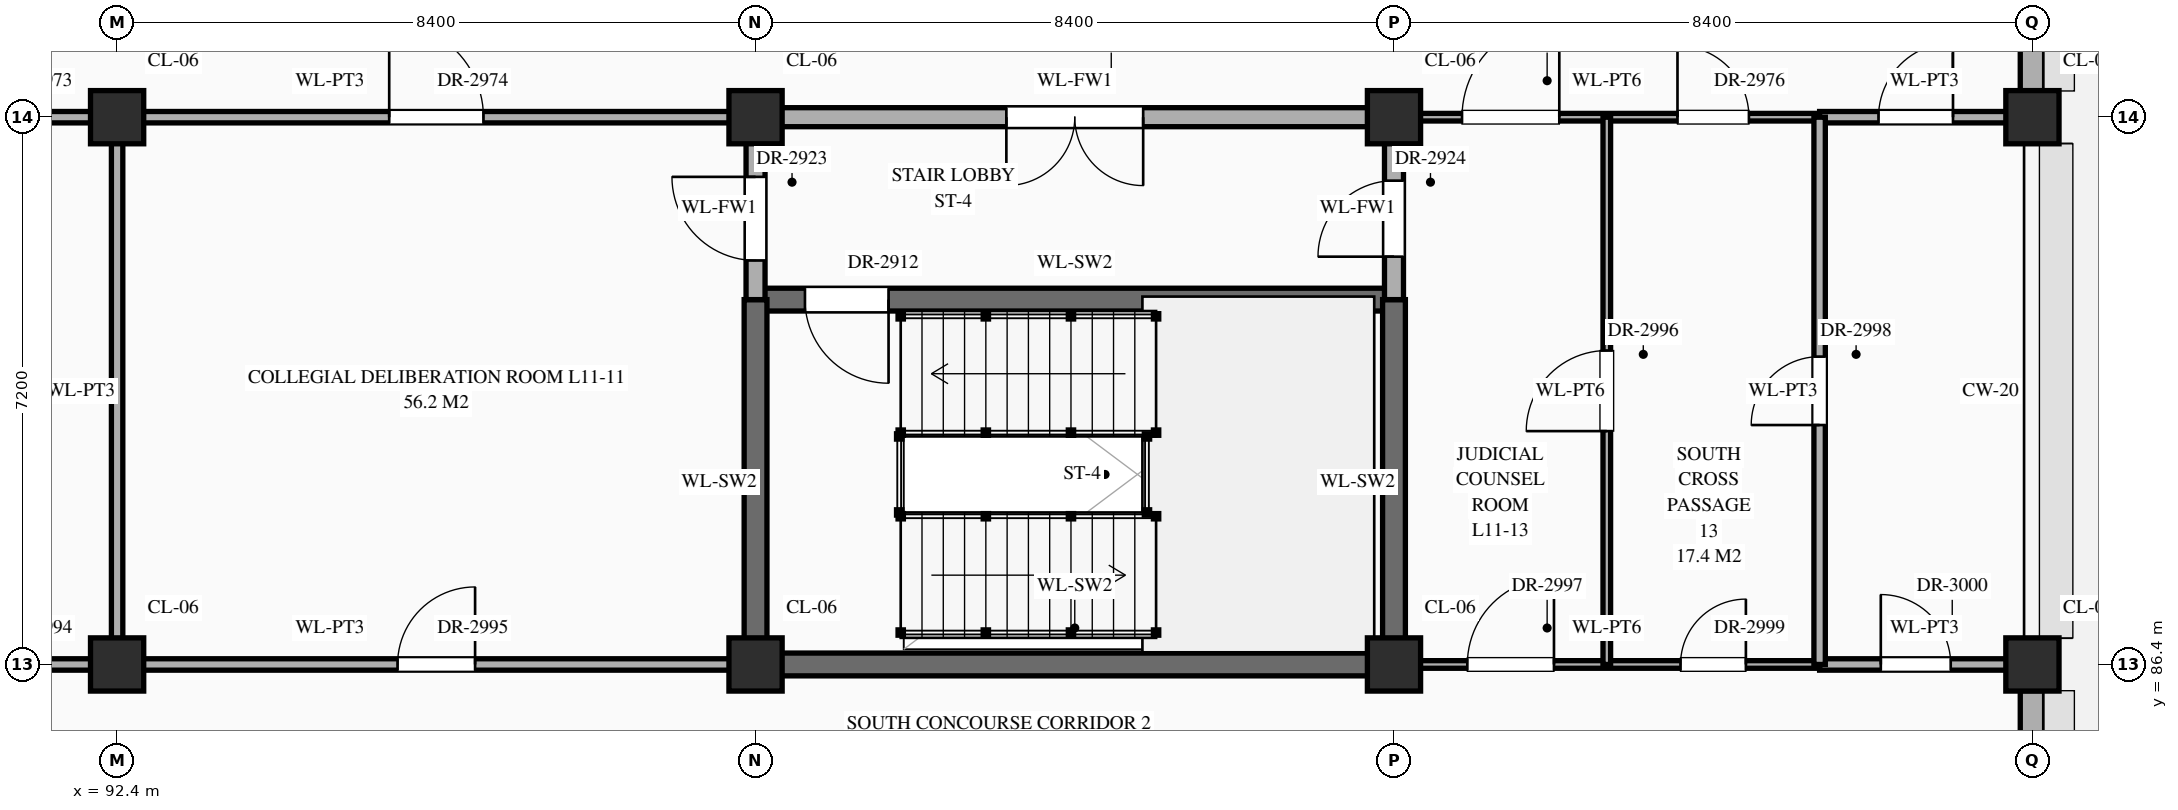
"""IFC4 building model, lengths in metres.
Left out: names, types, materials, properties, quantities, classifications, styles, units other than length and angle.
Written with IfcOpenShell. Run it as: python <this file> out.ifc"""

import sys

from ifc_helpers import new_model, si_unit, direction, frame, frame_2d, origin, origin_2d, place, context, subcontext, project, spatial, rectangle, extrude, element, fill, save


model = new_model("IFC4")
c1 = context("Model", 3, precision=1e-05, world=origin(), true_north=direction((0.0, 1.0)))
c2 = subcontext(c1, "Body", "Model", "MODEL_VIEW")
j1 = project(units=[si_unit("LENGTHUNIT", "METRE"), si_unit("PLANEANGLEUNIT", "RADIAN")], contexts=[c1])
p1 = place(None, origin())
s1 = spatial("IfcSite", under=j1, at=p1, CompositionType="ELEMENT")
p2 = place(p1, origin())
s2 = spatial("IfcBuilding", under=s1, at=p2, CompositionType="ELEMENT")
p3 = place(p2, frame((0.0, 0.0, 47.7)))
s3 = spatial("IfcBuildingStorey", under=s2, at=p3, CompositionType="ELEMENT", Elevation=47.7)
for number, where, z_axis, x_axis in (
    (1, (92.4, 86.4, 0.0), (0.0, 0.0, 1.0), (1.0, 0.0, 0.0)),
    (2, (92.4, 93.6, 0.0), (0.0, 0.0, 1.0), (1.0, 0.0, 0.0)),
    (3, (100.8, 86.4, 0.0), (0.0, 0.0, 1.0), (1.0, 0.0, 0.0)),
    (4, (100.8, 93.6, 0.0), (0.0, 0.0, 1.0), (1.0, 0.0, 0.0)),
    (5, (109.2, 86.4, 0.0), (0.0, 0.0, 1.0), (1.0, 0.0, 0.0)),
    (6, (109.2, 93.6, 0.0), (0.0, 0.0, 1.0), (1.0, 0.0, 0.0)),
    (7, (117.6, 86.4, 0.0), (0.0, 0.0, 1.0), (1.0, 0.0, 0.0)),
    (8, (117.6, 93.6, 0.0), (0.0, 0.0, 1.0), (1.0, 0.0, 0.0)),
):
    element("IfcColumn", number, at=place(p3, frame(where, z_axis=z_axis, x_axis=x_axis)), inside=s3, PredefinedType="COLUMN", context=c2, shape_type="SweptSolid", body=[
        extrude(rectangle(XDim=0.7, YDim=0.7, at=origin_2d()), origin(), (0.0, 0.0, 1.0), 4.2),
    ])
p4 = place(p3, frame((117.6, 79.545, 0.0), z_axis=(0.0, 0.0, 1.0), x_axis=(0.0, 1.0, 0.0)))
e9 = element("IfcWall", 9, at=p4, inside=s3, PredefinedType="STANDARD", context=c2, shape_type="SweptSolid", body=[
    extrude(rectangle(XDim=6.51, YDim=0.32, at=frame_2d((3.255, 0.0))), origin(), (0.0, 0.0, 1.0), 3.31),
])
p5 = place(p4, frame((1.53, 0.0, 0.55)))
e10 = element("IfcOpeningElement", 10, at=p5, cuts=e9, PredefinedType="OPENING", context=c2, shape_type="SweptSolid", body=[
    extrude(rectangle(XDim=1.05, YDim=1.56, at=frame_2d((0.525, 0.78))), frame((0.0, 0.172, 0.0), z_axis=(0.0, -1.0, 0.0), x_axis=(1.0, 0.0, 0.0)), (0.0, 0.0, 1.0), 0.344),
])
p6 = place(p3, frame((117.6, 93.945, 0.0), z_axis=(0.0, 0.0, 1.0), x_axis=(0.0, 1.0, 0.0)))
e11 = element("IfcWall", 11, at=p6, inside=s3, PredefinedType="STANDARD", context=c2, shape_type="SweptSolid", body=[
    extrude(rectangle(XDim=6.51, YDim=0.32, at=frame_2d((3.255, 0.0))), origin(), (0.0, 0.0, 1.0), 3.31),
])
p7 = place(p6, frame((3.88, 0.0, 0.55)))
e12 = element("IfcOpeningElement", 12, at=p7, cuts=e11, PredefinedType="OPENING", context=c2, shape_type="SweptSolid", body=[
    extrude(rectangle(XDim=1.35, YDim=1.92, at=frame_2d((0.675, 0.96))), frame((0.0, 0.172, 0.0), z_axis=(0.0, -1.0, 0.0), x_axis=(1.0, 0.0, 0.0)), (0.0, 0.0, 1.0), 0.344),
])
p8 = place(p3, frame((89.6, 86.4, 0.0), z_axis=(0.0, 0.0, 1.0), x_axis=(1.0, 0.0, 0.0)))
e13 = element("IfcWall", 13, at=p8, inside=s3, PredefinedType="STANDARD", context=c2, shape_type="SweptSolid", body=[
    extrude(rectangle(XDim=11.2, YDim=0.15, at=frame_2d((5.6, 0.0))), origin(), (0.0, 0.0, 1.0), 3.11),
])
p9 = place(p8, frame((0.775, 0.0, 0.0)))
e14 = element("IfcOpeningElement", 14, at=p9, cuts=e13, PredefinedType="OPENING", context=c2, shape_type="SweptSolid", body=[
    extrude(rectangle(XDim=0.98, YDim=2.35, at=frame_2d((0.49, 1.175))), frame((0.0, 0.087, 0.0), z_axis=(0.0, -1.0, 0.0), x_axis=(1.0, 0.0, 0.0)), (0.0, 0.0, 1.0), 0.174),
])
p10 = place(p8, frame((6.49, 0.0, 0.0)))
e15 = element("IfcOpeningElement", 15, at=p10, cuts=e13, PredefinedType="OPENING", context=c2, shape_type="SweptSolid", body=[
    extrude(rectangle(XDim=1.02, YDim=2.4, at=frame_2d((0.51, 1.2))), frame((0.0, 0.087, 0.0), z_axis=(0.0, -1.0, 0.0), x_axis=(1.0, 0.0, 0.0)), (0.0, 0.0, 1.0), 0.174),
])
p11 = place(p3, frame((100.8, 86.4, 0.0), z_axis=(0.0, 0.0, 1.0), x_axis=(1.0, 0.0, 0.0)))
e16 = element("IfcWall", 16, at=p11, inside=s3, PredefinedType="SHEAR", context=c2, shape_type="SweptSolid", body=[
    extrude(rectangle(XDim=8.4, YDim=0.3, at=frame_2d((4.2, 0.0))), origin(), (0.0, 0.0, 1.0), 3.96),
])
p12 = place(p3, frame((109.2, 86.4, 0.0), z_axis=(0.0, 0.0, 1.0), x_axis=(1.0, 0.0, 0.0)))
e17 = element("IfcWall", 17, at=p12, inside=s3, PredefinedType="STANDARD", context=c2, shape_type="SweptSolid", body=[
    extrude(rectangle(XDim=5.6, YDim=0.1, at=frame_2d((2.8, 0.0))), origin(), (0.0, 0.0, 1.0), 3.11),
])
p13 = place(p12, frame((0.965, 0.0, 0.0)))
e18 = element("IfcOpeningElement", 18, at=p13, cuts=e17, PredefinedType="OPENING", context=c2, shape_type="SweptSolid", body=[
    extrude(rectangle(XDim=1.14, YDim=2.4, at=frame_2d((0.57, 1.2))), frame((0.0, 0.062, 0.0), z_axis=(0.0, -1.0, 0.0), x_axis=(1.0, 0.0, 0.0)), (0.0, 0.0, 1.0), 0.124),
])
p14 = place(p12, frame((3.77, 0.0, 0.0)))
e19 = element("IfcOpeningElement", 19, at=p14, cuts=e17, PredefinedType="OPENING", context=c2, shape_type="SweptSolid", body=[
    extrude(rectangle(XDim=0.86, YDim=2.1, at=frame_2d((0.43, 1.05))), frame((0.0, 0.062, 0.0), z_axis=(0.0, -1.0, 0.0), x_axis=(1.0, 0.0, 0.0)), (0.0, 0.0, 1.0), 0.124),
])
p15 = place(p3, frame((114.8, 86.4, 0.0), z_axis=(0.0, 0.0, 1.0), x_axis=(1.0, 0.0, 0.0)))
e20 = element("IfcWall", 20, at=p15, inside=s3, PredefinedType="STANDARD", context=c2, shape_type="SweptSolid", body=[
    extrude(rectangle(XDim=2.76, YDim=0.15, at=frame_2d((1.38, 0.0))), origin(), (0.0, 0.0, 1.0), 3.11),
])
p16 = place(p15, frame((0.805, 0.0, 0.0)))
e21 = element("IfcOpeningElement", 21, at=p16, cuts=e20, PredefinedType="OPENING", context=c2, shape_type="SweptSolid", body=[
    extrude(rectangle(XDim=0.92, YDim=2.15, at=frame_2d((0.46, 1.075))), frame((0.0, 0.087, 0.0), z_axis=(0.0, -1.0, 0.0), x_axis=(1.0, 0.0, 0.0)), (0.0, 0.0, 1.0), 0.174),
])
p17 = place(p3, frame((100.8, 91.2, 0.0), z_axis=(0.0, 0.0, 1.0), x_axis=(1.0, 0.0, 0.0)))
e22 = element("IfcWall", 22, at=p17, inside=s3, PredefinedType="SHEAR", context=c2, shape_type="SweptSolid", body=[
    extrude(rectangle(XDim=8.4, YDim=0.3, at=frame_2d((4.2, 0.0))), origin(), (0.0, 0.0, 1.0), 3.96),
])
p18 = place(p17, frame((0.65, 0.0, 0.0)))
e23 = element("IfcOpeningElement", 23, at=p18, cuts=e22, PredefinedType="OPENING", context=c2, shape_type="SweptSolid", body=[
    extrude(rectangle(XDim=1.1, YDim=2.2, at=frame_2d((0.55, 1.1))), frame((0.0, 0.162, 0.0), z_axis=(0.0, -1.0, 0.0), x_axis=(1.0, 0.0, 0.0)), (0.0, 0.0, 1.0), 0.324),
])
p19 = place(p3, frame((89.6, 93.6, 0.0), z_axis=(0.0, 0.0, 1.0), x_axis=(1.0, 0.0, 0.0)))
e24 = element("IfcWall", 24, at=p19, inside=s3, PredefinedType="STANDARD", context=c2, shape_type="SweptSolid", body=[
    extrude(rectangle(XDim=11.2, YDim=0.15, at=frame_2d((5.6, 0.0))), origin(), (0.0, 0.0, 1.0), 3.11),
])
p20 = place(p19, frame((0.665, 0.0, 0.0)))
e25 = element("IfcOpeningElement", 25, at=p20, cuts=e24, PredefinedType="OPENING", context=c2, shape_type="SweptSolid", body=[
    extrude(rectangle(XDim=1.2, YDim=2.35, at=frame_2d((0.6, 1.175))), frame((0.0, 0.087, 0.0), z_axis=(0.0, -1.0, 0.0), x_axis=(1.0, 0.0, 0.0)), (0.0, 0.0, 1.0), 0.174),
])
p21 = place(p19, frame((6.38, 0.0, 0.0)))
e26 = element("IfcOpeningElement", 26, at=p21, cuts=e24, PredefinedType="OPENING", context=c2, shape_type="SweptSolid", body=[
    extrude(rectangle(XDim=1.24, YDim=2.3, at=frame_2d((0.62, 1.15))), frame((0.0, 0.087, 0.0), z_axis=(0.0, -1.0, 0.0), x_axis=(1.0, 0.0, 0.0)), (0.0, 0.0, 1.0), 0.174),
])
p22 = place(p3, frame((100.8, 93.6, 0.0), z_axis=(0.0, 0.0, 1.0), x_axis=(1.0, 0.0, 0.0)))
e27 = element("IfcWall", 27, at=p22, inside=s3, PredefinedType="STANDARD", context=c2, shape_type="SweptSolid", body=[
    extrude(rectangle(XDim=8.4, YDim=0.25, at=frame_2d((4.2, 0.0))), origin(), (0.0, 0.0, 1.0), 3.11),
])
p23 = place(p22, frame((3.3, 0.0, 0.0)))
e28 = element("IfcOpeningElement", 28, at=p23, cuts=e27, PredefinedType="OPENING", context=c2, shape_type="SweptSolid", body=[
    extrude(rectangle(XDim=1.8, YDim=2.35, at=frame_2d((0.9, 1.175))), frame((0.0, 0.137, 0.0), z_axis=(0.0, -1.0, 0.0), x_axis=(1.0, 0.0, 0.0)), (0.0, 0.0, 1.0), 0.274),
])
p24 = place(p3, frame((109.2, 93.6, 0.0), z_axis=(0.0, 0.0, 1.0), x_axis=(1.0, 0.0, 0.0)))
e29 = element("IfcWall", 29, at=p24, inside=s3, PredefinedType="STANDARD", context=c2, shape_type="SweptSolid", body=[
    extrude(rectangle(XDim=5.6, YDim=0.1, at=frame_2d((2.8, 0.0))), origin(), (0.0, 0.0, 1.0), 3.11),
])
p25 = place(p24, frame((0.895, 0.0, 0.0)))
e30 = element("IfcOpeningElement", 30, at=p25, cuts=e29, PredefinedType="OPENING", context=c2, shape_type="SweptSolid", body=[
    extrude(rectangle(XDim=1.28, YDim=2.35, at=frame_2d((0.64, 1.175))), frame((0.0, 0.062, 0.0), z_axis=(0.0, -1.0, 0.0), x_axis=(1.0, 0.0, 0.0)), (0.0, 0.0, 1.0), 0.124),
])
p26 = place(p24, frame((3.73, 0.0, 0.0)))
e31 = element("IfcOpeningElement", 31, at=p26, cuts=e29, PredefinedType="OPENING", context=c2, shape_type="SweptSolid", body=[
    extrude(rectangle(XDim=0.94, YDim=2.3, at=frame_2d((0.47, 1.15))), frame((0.0, 0.062, 0.0), z_axis=(0.0, -1.0, 0.0), x_axis=(1.0, 0.0, 0.0)), (0.0, 0.0, 1.0), 0.124),
])
p27 = place(p3, frame((114.8, 93.6, 0.0), z_axis=(0.0, 0.0, 1.0), x_axis=(1.0, 0.0, 0.0)))
e32 = element("IfcWall", 32, at=p27, inside=s3, PredefinedType="STANDARD", context=c2, shape_type="SweptSolid", body=[
    extrude(rectangle(XDim=2.76, YDim=0.15, at=frame_2d((1.38, 0.0))), origin(), (0.0, 0.0, 1.0), 3.11),
])
p28 = place(p27, frame((0.775, 0.0, 0.0)))
e33 = element("IfcOpeningElement", 33, at=p28, cuts=e32, PredefinedType="OPENING", context=c2, shape_type="SweptSolid", body=[
    extrude(rectangle(XDim=0.98, YDim=2.35, at=frame_2d((0.49, 1.175))), frame((0.0, 0.087, 0.0), z_axis=(0.0, -1.0, 0.0), x_axis=(1.0, 0.0, 0.0)), (0.0, 0.0, 1.0), 0.174),
])
p29 = place(p3, frame((92.4, 86.4, 0.0), z_axis=(0.0, 0.0, 1.0), x_axis=(0.0, 1.0, 0.0)))
e34 = element("IfcWall", 34, at=p29, inside=s3, PredefinedType="STANDARD", context=c2, shape_type="SweptSolid", body=[
    extrude(rectangle(XDim=7.2, YDim=0.15, at=frame_2d((3.6, 0.0))), origin(), (0.0, 0.0, 1.0), 3.21),
])
p30 = place(p3, frame((100.8, 86.4, 0.0), z_axis=(0.0, 0.0, 1.0), x_axis=(0.0, 1.0, 0.0)))
e35 = element("IfcWall", 35, at=p30, inside=s3, PredefinedType="SHEAR", context=c2, shape_type="SweptSolid", body=[
    extrude(rectangle(XDim=4.8, YDim=0.3, at=frame_2d((2.4, 0.0))), origin(), (0.0, 0.0, 1.0), 3.96),
])
p31 = place(p3, frame((100.8, 91.2, 0.0), z_axis=(0.0, 0.0, 1.0), x_axis=(0.0, 1.0, 0.0)))
e36 = element("IfcWall", 36, at=p31, inside=s3, PredefinedType="STANDARD", context=c2, shape_type="SweptSolid", body=[
    extrude(rectangle(XDim=2.4, YDim=0.25, at=frame_2d((1.2, 0.0))), origin(), (0.0, 0.0, 1.0), 3.21),
])
p32 = place(p31, frame((0.515, 0.0, 0.0)))
e37 = element("IfcOpeningElement", 37, at=p32, cuts=e36, PredefinedType="OPENING", context=c2, shape_type="SweptSolid", body=[
    extrude(rectangle(XDim=1.1, YDim=2.2, at=frame_2d((0.55, 1.1))), frame((0.0, 0.137, 0.0), z_axis=(0.0, -1.0, 0.0), x_axis=(1.0, 0.0, 0.0)), (0.0, 0.0, 1.0), 0.274),
])
p33 = place(p3, frame((109.2, 86.4, 0.0), z_axis=(0.0, 0.0, 1.0), x_axis=(0.0, 1.0, 0.0)))
e38 = element("IfcWall", 38, at=p33, inside=s3, PredefinedType="SHEAR", context=c2, shape_type="SweptSolid", body=[
    extrude(rectangle(XDim=4.8, YDim=0.3, at=frame_2d((2.4, 0.0))), origin(), (0.0, 0.0, 1.0), 3.96),
])
p34 = place(p3, frame((109.2, 91.2, 0.0), z_axis=(0.0, 0.0, 1.0), x_axis=(0.0, 1.0, 0.0)))
e39 = element("IfcWall", 39, at=p34, inside=s3, PredefinedType="STANDARD", context=c2, shape_type="SweptSolid", body=[
    extrude(rectangle(XDim=2.4, YDim=0.25, at=frame_2d((1.2, 0.0))), origin(), (0.0, 0.0, 1.0), 3.21),
])
p35 = place(p34, frame((0.565, 0.0, 0.0)))
e40 = element("IfcOpeningElement", 40, at=p35, cuts=e39, PredefinedType="OPENING", context=c2, shape_type="SweptSolid", body=[
    extrude(rectangle(XDim=1.0, YDim=2.2, at=frame_2d((0.5, 1.1))), frame((0.0, 0.137, 0.0), z_axis=(0.0, -1.0, 0.0), x_axis=(1.0, 0.0, 0.0)), (0.0, 0.0, 1.0), 0.274),
])
p36 = place(p3, frame((112.0, 86.4, 0.0), z_axis=(0.0, 0.0, 1.0), x_axis=(0.0, 1.0, 0.0)))
e41 = element("IfcWall", 41, at=p36, inside=s3, PredefinedType="STANDARD", context=c2, shape_type="SweptSolid", body=[
    extrude(rectangle(XDim=7.2, YDim=0.1, at=frame_2d((3.6, 0.0))), origin(), (0.0, 0.0, 1.0), 3.96),
])
p37 = place(p36, frame((3.07, 0.0, 0.0)))
e42 = element("IfcOpeningElement", 42, at=p37, cuts=e41, PredefinedType="OPENING", context=c2, shape_type="SweptSolid", body=[
    extrude(rectangle(XDim=1.06, YDim=2.4, at=frame_2d((0.53, 1.2))), frame((0.0, 0.062, 0.0), z_axis=(0.0, -1.0, 0.0), x_axis=(1.0, 0.0, 0.0)), (0.0, 0.0, 1.0), 0.124),
])
p38 = place(p3, frame((114.8, 86.4, 0.0), z_axis=(0.0, 0.0, 1.0), x_axis=(0.0, 1.0, 0.0)))
e43 = element("IfcWall", 43, at=p38, inside=s3, PredefinedType="STANDARD", context=c2, shape_type="SweptSolid", body=[
    extrude(rectangle(XDim=7.2, YDim=0.15, at=frame_2d((3.6, 0.0))), origin(), (0.0, 0.0, 1.0), 3.96),
])
p39 = place(p38, frame((3.15, 0.0, 0.0)))
e44 = element("IfcOpeningElement", 44, at=p39, cuts=e43, PredefinedType="OPENING", context=c2, shape_type="SweptSolid", body=[
    extrude(rectangle(XDim=0.9, YDim=2.15, at=frame_2d((0.45, 1.075))), frame((0.0, 0.087, 0.0), z_axis=(0.0, -1.0, 0.0), x_axis=(1.0, 0.0, 0.0)), (0.0, 0.0, 1.0), 0.174),
])
p40 = place(p18, frame((1.1, 0.0, 0.0), z_axis=(0.0, 0.0, 1.0), x_axis=(-1.0, 0.0, 0.0)))
e45 = element("IfcDoor", 45, at=p40, inside=s3, OperationType="SINGLE_SWING_LEFT", PredefinedType="DOOR", context=c2, shape_type="SweptSolid", body=[
    extrude(rectangle(XDim=1.1, YDim=2.2, at=frame_2d((0.55, 1.1))), frame((0.0, 0.025, 0.0), z_axis=(0.0, -1.0, 0.0), x_axis=(1.0, 0.0, 0.0)), (0.0, 0.0, 1.0), 0.05),
])
fill(e23, e45)
p41 = place(p23, frame((1.8, 0.0, 0.0), z_axis=(0.0, 0.0, 1.0), x_axis=(-1.0, 0.0, 0.0)))
e46 = element("IfcDoor", 46, at=p41, inside=s3, OperationType="DOUBLE_DOOR_SINGLE_SWING", PredefinedType="DOOR", context=c2, shape_type="SweptSolid", body=[
    extrude(rectangle(XDim=1.8, YDim=2.35, at=frame_2d((0.9, 1.175))), frame((0.0, 0.025, 0.0), z_axis=(0.0, -1.0, 0.0), x_axis=(1.0, 0.0, 0.0)), (0.0, 0.0, 1.0), 0.05),
])
fill(e28, e46)
p42 = place(p32, origin())
e47 = element("IfcDoor", 47, at=p42, inside=s3, OperationType="SINGLE_SWING_RIGHT", PredefinedType="DOOR", context=c2, shape_type="SweptSolid", body=[
    extrude(rectangle(XDim=1.1, YDim=2.2, at=frame_2d((0.55, 1.1))), frame((0.0, 0.025, 0.0), z_axis=(0.0, -1.0, 0.0), x_axis=(1.0, 0.0, 0.0)), (0.0, 0.0, 1.0), 0.05),
])
fill(e37, e47)
p43 = place(p35, origin())
e48 = element("IfcDoor", 48, at=p43, inside=s3, OperationType="SINGLE_SWING_LEFT", PredefinedType="DOOR", context=c2, shape_type="SweptSolid", body=[
    extrude(rectangle(XDim=1.0, YDim=2.2, at=frame_2d((0.5, 1.1))), frame((0.0, 0.025, 0.0), z_axis=(0.0, -1.0, 0.0), x_axis=(1.0, 0.0, 0.0)), (0.0, 0.0, 1.0), 0.05),
])
fill(e40, e48)
p44 = place(p21, origin())
e49 = element("IfcDoor", 49, at=p44, inside=s3, OperationType="SINGLE_SWING_LEFT", PredefinedType="DOOR", context=c2, shape_type="SweptSolid", body=[
    extrude(rectangle(XDim=1.24, YDim=2.3, at=frame_2d((0.62, 1.15))), frame((0.0, 0.025, 0.0), z_axis=(0.0, -1.0, 0.0), x_axis=(1.0, 0.0, 0.0)), (0.0, 0.0, 1.0), 0.05),
])
fill(e26, e49)
p45 = place(p25, origin())
e50 = element("IfcDoor", 50, at=p45, inside=s3, OperationType="SINGLE_SWING_RIGHT", PredefinedType="DOOR", context=c2, shape_type="SweptSolid", body=[
    extrude(rectangle(XDim=1.28, YDim=2.35, at=frame_2d((0.64, 1.175))), frame((0.0, 0.025, 0.0), z_axis=(0.0, -1.0, 0.0), x_axis=(1.0, 0.0, 0.0)), (0.0, 0.0, 1.0), 0.05),
])
fill(e30, e50)
p46 = place(p26, origin())
e51 = element("IfcDoor", 51, at=p46, inside=s3, OperationType="SINGLE_SWING_LEFT", PredefinedType="DOOR", context=c2, shape_type="SweptSolid", body=[
    extrude(rectangle(XDim=0.94, YDim=2.3, at=frame_2d((0.47, 1.15))), frame((0.0, 0.025, 0.0), z_axis=(0.0, -1.0, 0.0), x_axis=(1.0, 0.0, 0.0)), (0.0, 0.0, 1.0), 0.05),
])
fill(e31, e51)
p47 = place(p28, origin())
e52 = element("IfcDoor", 52, at=p47, inside=s3, OperationType="SINGLE_SWING_RIGHT", PredefinedType="DOOR", context=c2, shape_type="SweptSolid", body=[
    extrude(rectangle(XDim=0.98, YDim=2.35, at=frame_2d((0.49, 1.175))), frame((0.0, 0.025, 0.0), z_axis=(0.0, -1.0, 0.0), x_axis=(1.0, 0.0, 0.0)), (0.0, 0.0, 1.0), 0.05),
])
fill(e33, e52)
p48 = place(p10, origin())
e53 = element("IfcDoor", 53, at=p48, inside=s3, OperationType="SINGLE_SWING_RIGHT", PredefinedType="DOOR", context=c2, shape_type="SweptSolid", body=[
    extrude(rectangle(XDim=1.02, YDim=2.4, at=frame_2d((0.51, 1.2))), frame((0.0, 0.025, 0.0), z_axis=(0.0, -1.0, 0.0), x_axis=(1.0, 0.0, 0.0)), (0.0, 0.0, 1.0), 0.05),
])
fill(e15, e53)
p49 = place(p37, origin())
e54 = element("IfcDoor", 54, at=p49, inside=s3, OperationType="SINGLE_SWING_LEFT", PredefinedType="DOOR", context=c2, shape_type="SweptSolid", body=[
    extrude(rectangle(XDim=1.06, YDim=2.4, at=frame_2d((0.53, 1.2))), frame((0.0, 0.025, 0.0), z_axis=(0.0, -1.0, 0.0), x_axis=(1.0, 0.0, 0.0)), (0.0, 0.0, 1.0), 0.05),
])
fill(e42, e54)
p50 = place(p13, origin())
e55 = element("IfcDoor", 55, at=p50, inside=s3, OperationType="SINGLE_SWING_RIGHT", PredefinedType="DOOR", context=c2, shape_type="SweptSolid", body=[
    extrude(rectangle(XDim=1.14, YDim=2.4, at=frame_2d((0.57, 1.2))), frame((0.0, 0.025, 0.0), z_axis=(0.0, -1.0, 0.0), x_axis=(1.0, 0.0, 0.0)), (0.0, 0.0, 1.0), 0.05),
])
fill(e18, e55)
p51 = place(p39, origin())
e56 = element("IfcDoor", 56, at=p51, inside=s3, OperationType="SINGLE_SWING_LEFT", PredefinedType="DOOR", context=c2, shape_type="SweptSolid", body=[
    extrude(rectangle(XDim=0.9, YDim=2.15, at=frame_2d((0.45, 1.075))), frame((0.0, 0.025, 0.0), z_axis=(0.0, -1.0, 0.0), x_axis=(1.0, 0.0, 0.0)), (0.0, 0.0, 1.0), 0.05),
])
fill(e44, e56)
p52 = place(p14, origin())
e57 = element("IfcDoor", 57, at=p52, inside=s3, OperationType="SINGLE_SWING_RIGHT", PredefinedType="DOOR", context=c2, shape_type="SweptSolid", body=[
    extrude(rectangle(XDim=0.86, YDim=2.1, at=frame_2d((0.43, 1.05))), frame((0.0, 0.025, 0.0), z_axis=(0.0, -1.0, 0.0), x_axis=(1.0, 0.0, 0.0)), (0.0, 0.0, 1.0), 0.05),
])
fill(e19, e57)
p53 = place(p16, origin())
e58 = element("IfcDoor", 58, at=p53, inside=s3, OperationType="SINGLE_SWING_LEFT", PredefinedType="DOOR", context=c2, shape_type="SweptSolid", body=[
    extrude(rectangle(XDim=0.92, YDim=2.15, at=frame_2d((0.46, 1.075))), frame((0.0, 0.025, 0.0), z_axis=(0.0, -1.0, 0.0), x_axis=(1.0, 0.0, 0.0)), (0.0, 0.0, 1.0), 0.05),
])
fill(e21, e58)
save(model, sys.argv[1])
